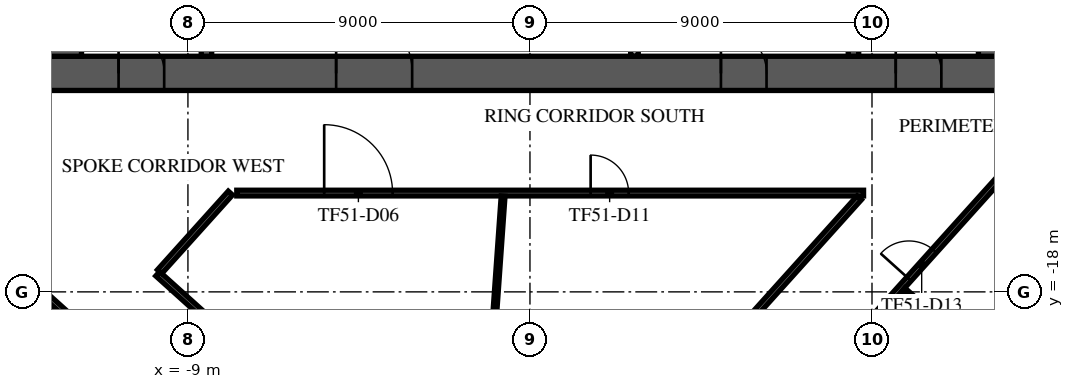
"""IFC4 building model, lengths in metres.
Left out: names, types, materials, properties, quantities, classifications, styles, units other than length and angle.
Written with IfcOpenShell. Run it as: python <this file> out.ifc"""

import sys

from ifc_helpers import new_model, si_unit, direction, frame, frame_2d, origin, place, context, subcontext, project, spatial, rectangle, extrude, element, fill, save


model = new_model("IFC4")
c1 = context("Model", 3, precision=1e-05, world=origin(), true_north=direction((0.0, 1.0)))
c2 = subcontext(c1, "Body", "Model", "MODEL_VIEW")
j1 = project(units=[si_unit("LENGTHUNIT", "METRE"), si_unit("PLANEANGLEUNIT", "RADIAN")], contexts=[c1])
p1 = place(None, origin())
s1 = spatial("IfcSite", under=j1, at=p1, CompositionType="ELEMENT")
p2 = place(p1, origin())
s2 = spatial("IfcBuilding", under=s1, at=p2, CompositionType="ELEMENT")
p3 = place(p2, frame((0.0, 0.0, 217.3)))
s3 = spatial("IfcBuildingStorey", under=s2, at=p3, CompositionType="ELEMENT", Elevation=217.3)
p4 = place(p3, frame((-12.7, -12.25, 0.0), z_axis=(0.0, 0.0, 1.0), x_axis=(1.0, 0.0, 0.0)))
e1 = element("IfcWall", 1, at=p4, inside=s3, PredefinedType="SHEAR", context=c2, shape_type="SweptSolid", body=[
    extrude(rectangle(XDim=25.4, YDim=0.9, at=frame_2d((12.7, 0.0))), origin(), (0.0, 0.0, 1.0), 3.62),
])
p5 = place(p4, frame((7.6, 0.0, 0.0)))
e2 = element("IfcOpeningElement", 2, at=p5, cuts=e1, PredefinedType="OPENING", context=c2, shape_type="SweptSolid", body=[
    extrude(rectangle(XDim=2.0, YDim=2.1, at=frame_2d((1.0, 1.05))), frame((0.0, 0.46, 0.0), z_axis=(0.0, -1.0, 0.0), x_axis=(1.0, 0.0, 0.0)), (0.0, 0.0, 1.0), 0.92),
])
p6 = place(p4, frame((17.725, 0.0, 0.0)))
e3 = element("IfcOpeningElement", 3, at=p6, cuts=e1, PredefinedType="OPENING", context=c2, shape_type="SweptSolid", body=[
    extrude(rectangle(XDim=1.2, YDim=2.1, at=frame_2d((0.6, 1.05))), frame((0.0, 0.46, 0.0), z_axis=(0.0, -1.0, 0.0), x_axis=(1.0, 0.0, 0.0)), (0.0, 0.0, 1.0), 0.92),
])
p7 = place(p4, frame((1.875, 0.0, 0.0)))
e4 = element("IfcOpeningElement", 4, at=p7, cuts=e1, PredefinedType="OPENING", context=c2, shape_type="SweptSolid", body=[
    extrude(rectangle(XDim=1.2, YDim=2.1, at=frame_2d((0.6, 1.05))), frame((0.0, 0.46, 0.0), z_axis=(0.0, -1.0, 0.0), x_axis=(1.0, 0.0, 0.0)), (0.0, 0.0, 1.0), 0.92),
])
p8 = place(p4, frame((22.325, 0.0, 0.0)))
e5 = element("IfcOpeningElement", 5, at=p8, cuts=e1, PredefinedType="OPENING", context=c2, shape_type="SweptSolid", body=[
    extrude(rectangle(XDim=1.2, YDim=2.1, at=frame_2d((0.6, 1.05))), frame((0.0, 0.46, 0.0), z_axis=(0.0, -1.0, 0.0), x_axis=(1.0, 0.0, 0.0)), (0.0, 0.0, 1.0), 0.92),
])
p9 = place(p3, frame((12.25, -11.8, 0.0), z_axis=(0.0, 0.0, 1.0), x_axis=(0.0, 1.0, 0.0)))
e6 = element("IfcWall", 6, at=p9, inside=s3, PredefinedType="SHEAR", context=c2, shape_type="SweptSolid", body=[
    extrude(rectangle(XDim=23.6, YDim=0.9, at=frame_2d((11.8, 0.0))), origin(), (0.0, 0.0, 1.0), 3.62),
])
p10 = place(p9, frame((10.6, 0.0, 0.0)))
e7 = element("IfcOpeningElement", 7, at=p10, cuts=e6, PredefinedType="OPENING", context=c2, shape_type="SweptSolid", body=[
    extrude(rectangle(XDim=2.4, YDim=2.4, at=frame_2d((1.2, 1.2))), frame((0.0, 0.46, 0.0), z_axis=(0.0, -1.0, 0.0), x_axis=(1.0, 0.0, 0.0)), (0.0, 0.0, 1.0), 0.92),
])
p11 = place(p3, frame((-12.25, -11.8, 0.0), z_axis=(0.0, 0.0, 1.0), x_axis=(0.0, 1.0, 0.0)))
e8 = element("IfcWall", 8, at=p11, inside=s3, PredefinedType="SHEAR", context=c2, shape_type="SweptSolid", body=[
    extrude(rectangle(XDim=23.6, YDim=0.9, at=frame_2d((11.8, 0.0))), origin(), (0.0, 0.0, 1.0), 3.62),
])
p12 = place(p11, frame((10.6, 0.0, 0.0)))
e9 = element("IfcOpeningElement", 9, at=p12, cuts=e8, PredefinedType="OPENING", context=c2, shape_type="SweptSolid", body=[
    extrude(rectangle(XDim=2.4, YDim=2.4, at=frame_2d((1.2, 1.2))), frame((0.0, 0.46, 0.0), z_axis=(0.0, -1.0, 0.0), x_axis=(1.0, 0.0, 0.0)), (0.0, 0.0, 1.0), 0.92),
])
p13 = place(p3, frame((-8.512, -4.55, 0.0), z_axis=(0.0, 0.0, 1.0), x_axis=(0.0, -1.0, 0.0)))
e10 = element("IfcWall", 10, at=p13, inside=s3, PredefinedType="SOLIDWALL", context=c2, shape_type="SweptSolid", body=[
    extrude(rectangle(XDim=7.25, YDim=0.275, at=frame_2d((3.625, 0.0))), origin(), (0.0, 0.0, 1.0), 3.62),
])
p14 = place(p13, frame((6.0, 0.0, 0.0)))
e11 = element("IfcOpeningElement", 11, at=p14, cuts=e10, PredefinedType="OPENING", context=c2, shape_type="SweptSolid", body=[
    extrude(rectangle(XDim=1.0, YDim=2.1, at=frame_2d((0.5, 1.05))), frame((0.0, 0.147, 0.0), z_axis=(0.0, -1.0, 0.0), x_axis=(1.0, 0.0, 0.0)), (0.0, 0.0, 1.0), 0.295),
])
p15 = place(p3, frame((8.512, -4.55, 0.0), z_axis=(0.0, 0.0, 1.0), x_axis=(0.0, -1.0, 0.0)))
e12 = element("IfcWall", 12, at=p15, inside=s3, PredefinedType="SOLIDWALL", context=c2, shape_type="SweptSolid", body=[
    extrude(rectangle(XDim=7.25, YDim=0.275, at=frame_2d((3.625, 0.0))), origin(), (0.0, 0.0, 1.0), 3.62),
])
p16 = place(p15, frame((6.0, 0.0, 0.0)))
e13 = element("IfcOpeningElement", 13, at=p16, cuts=e12, PredefinedType="OPENING", context=c2, shape_type="SweptSolid", body=[
    extrude(rectangle(XDim=1.0, YDim=2.1, at=frame_2d((0.5, 1.05))), frame((0.0, 0.147, 0.0), z_axis=(0.0, -1.0, 0.0), x_axis=(1.0, 0.0, 0.0)), (0.0, 0.0, 1.0), 0.295),
])
p17 = place(p3, frame((2.75, -11.795, 0.0), z_axis=(0.0, 0.0, 1.0), x_axis=(0.0, 1.0, 0.0)))
e14 = element("IfcWall", 14, at=p17, inside=s3, PredefinedType="PARTITIONING", context=c2, shape_type="SweptSolid", body=[
    extrude(rectangle(XDim=2.99, YDim=0.2, at=frame_2d((1.495, 0.0))), origin(), (0.0, 0.0, 1.0), 3.62),
])
p18 = place(p3, frame((-34.365, -9.023, 0.0), z_axis=(0.0, 0.0, 1.0), x_axis=(0.743146896498, -0.66912830625, 0.0)))
e15 = element("IfcWall", 15, at=p18, inside=s3, PredefinedType="STANDARD", context=c2, shape_type="SweptSolid", body=[
    extrude(rectangle(XDim=39.0, YDim=0.6, at=frame_2d((19.5, 0.0))), origin(), (0.0, 0.0, 1.0), 3.62),
])
p19 = place(p18, frame((1.217, 0.0, 0.9)))
e16 = element("IfcOpeningElement", 16, at=p19, cuts=e15, PredefinedType="OPENING", context=c2, shape_type="SweptSolid", body=[
    extrude(rectangle(XDim=1.9, YDim=2.1, at=frame_2d((0.95, 1.05))), frame((0.0, 0.31, 0.0), z_axis=(0.0, -1.0, 0.0), x_axis=(1.0, 0.0, 0.0)), (0.0, 0.0, 1.0), 0.62),
])
p20 = place(p18, frame((5.55, 0.0, 0.9)))
e17 = element("IfcOpeningElement", 17, at=p20, cuts=e15, PredefinedType="OPENING", context=c2, shape_type="SweptSolid", body=[
    extrude(rectangle(XDim=1.9, YDim=2.1, at=frame_2d((0.95, 1.05))), frame((0.0, 0.31, 0.0), z_axis=(0.0, -1.0, 0.0), x_axis=(1.0, 0.0, 0.0)), (0.0, 0.0, 1.0), 0.62),
])
p21 = place(p18, frame((9.883, 0.0, 0.9)))
e18 = element("IfcOpeningElement", 18, at=p21, cuts=e15, PredefinedType="OPENING", context=c2, shape_type="SweptSolid", body=[
    extrude(rectangle(XDim=1.9, YDim=2.1, at=frame_2d((0.95, 1.05))), frame((0.0, 0.31, 0.0), z_axis=(0.0, -1.0, 0.0), x_axis=(1.0, 0.0, 0.0)), (0.0, 0.0, 1.0), 0.62),
])
p22 = place(p18, frame((14.217, 0.0, 0.9)))
e19 = element("IfcOpeningElement", 19, at=p22, cuts=e15, PredefinedType="OPENING", context=c2, shape_type="SweptSolid", body=[
    extrude(rectangle(XDim=1.9, YDim=2.1, at=frame_2d((0.95, 1.05))), frame((0.0, 0.31, 0.0), z_axis=(0.0, -1.0, 0.0), x_axis=(1.0, 0.0, 0.0)), (0.0, 0.0, 1.0), 0.62),
])
p23 = place(p18, frame((18.55, 0.0, 0.9)))
e20 = element("IfcOpeningElement", 20, at=p23, cuts=e15, PredefinedType="OPENING", context=c2, shape_type="SweptSolid", body=[
    extrude(rectangle(XDim=1.9, YDim=2.1, at=frame_2d((0.95, 1.05))), frame((0.0, 0.31, 0.0), z_axis=(0.0, -1.0, 0.0), x_axis=(1.0, 0.0, 0.0)), (0.0, 0.0, 1.0), 0.62),
])
p24 = place(p18, frame((22.883, 0.0, 0.9)))
e21 = element("IfcOpeningElement", 21, at=p24, cuts=e15, PredefinedType="OPENING", context=c2, shape_type="SweptSolid", body=[
    extrude(rectangle(XDim=1.9, YDim=2.1, at=frame_2d((0.95, 1.05))), frame((0.0, 0.31, 0.0), z_axis=(0.0, -1.0, 0.0), x_axis=(1.0, 0.0, 0.0)), (0.0, 0.0, 1.0), 0.62),
])
p25 = place(p18, frame((27.217, 0.0, 0.9)))
e22 = element("IfcOpeningElement", 22, at=p25, cuts=e15, PredefinedType="OPENING", context=c2, shape_type="SweptSolid", body=[
    extrude(rectangle(XDim=1.9, YDim=2.1, at=frame_2d((0.95, 1.05))), frame((0.0, 0.31, 0.0), z_axis=(0.0, -1.0, 0.0), x_axis=(1.0, 0.0, 0.0)), (0.0, 0.0, 1.0), 0.62),
])
p26 = place(p18, frame((31.55, 0.0, 0.9)))
e23 = element("IfcOpeningElement", 23, at=p26, cuts=e15, PredefinedType="OPENING", context=c2, shape_type="SweptSolid", body=[
    extrude(rectangle(XDim=1.9, YDim=2.1, at=frame_2d((0.95, 1.05))), frame((0.0, 0.31, 0.0), z_axis=(0.0, -1.0, 0.0), x_axis=(1.0, 0.0, 0.0)), (0.0, 0.0, 1.0), 0.62),
])
p27 = place(p18, frame((35.883, 0.0, 0.9)))
e24 = element("IfcOpeningElement", 24, at=p27, cuts=e15, PredefinedType="OPENING", context=c2, shape_type="SweptSolid", body=[
    extrude(rectangle(XDim=1.9, YDim=2.1, at=frame_2d((0.95, 1.05))), frame((0.0, 0.31, 0.0), z_axis=(0.0, -1.0, 0.0), x_axis=(1.0, 0.0, 0.0)), (0.0, 0.0, 1.0), 0.62),
])
p28 = place(p3, frame((1.962, -34.735, 0.0), z_axis=(0.0, 0.0, 1.0), x_axis=(0.669133181838, 0.743142506497, 0.0)))
e25 = element("IfcWall", 25, at=p28, inside=s3, PredefinedType="STANDARD", context=c2, shape_type="SweptSolid", body=[
    extrude(rectangle(XDim=49.0, YDim=0.6, at=frame_2d((24.5, 0.0))), origin(), (0.0, 0.0, 1.0), 3.62),
])
p29 = place(p28, frame((1.227, 0.0, 0.9)))
e26 = element("IfcOpeningElement", 26, at=p29, cuts=e25, PredefinedType="OPENING", context=c2, shape_type="SweptSolid", body=[
    extrude(rectangle(XDim=2.0, YDim=2.1, at=frame_2d((1.0, 1.05))), frame((0.0, 0.31, 0.0), z_axis=(0.0, -1.0, 0.0), x_axis=(1.0, 0.0, 0.0)), (0.0, 0.0, 1.0), 0.62),
])
p30 = place(p28, frame((5.682, 0.0, 0.9)))
e27 = element("IfcOpeningElement", 27, at=p30, cuts=e25, PredefinedType="OPENING", context=c2, shape_type="SweptSolid", body=[
    extrude(rectangle(XDim=2.0, YDim=2.1, at=frame_2d((1.0, 1.05))), frame((0.0, 0.31, 0.0), z_axis=(0.0, -1.0, 0.0), x_axis=(1.0, 0.0, 0.0)), (0.0, 0.0, 1.0), 0.62),
])
p31 = place(p28, frame((10.136, 0.0, 0.9)))
e28 = element("IfcOpeningElement", 28, at=p31, cuts=e25, PredefinedType="OPENING", context=c2, shape_type="SweptSolid", body=[
    extrude(rectangle(XDim=2.0, YDim=2.1, at=frame_2d((1.0, 1.05))), frame((0.0, 0.31, 0.0), z_axis=(0.0, -1.0, 0.0), x_axis=(1.0, 0.0, 0.0)), (0.0, 0.0, 1.0), 0.62),
])
p32 = place(p28, frame((14.591, 0.0, 0.9)))
e29 = element("IfcOpeningElement", 29, at=p32, cuts=e25, PredefinedType="OPENING", context=c2, shape_type="SweptSolid", body=[
    extrude(rectangle(XDim=2.0, YDim=2.1, at=frame_2d((1.0, 1.05))), frame((0.0, 0.31, 0.0), z_axis=(0.0, -1.0, 0.0), x_axis=(1.0, 0.0, 0.0)), (0.0, 0.0, 1.0), 0.62),
])
p33 = place(p28, frame((19.045, 0.0, 0.9)))
e30 = element("IfcOpeningElement", 30, at=p33, cuts=e25, PredefinedType="OPENING", context=c2, shape_type="SweptSolid", body=[
    extrude(rectangle(XDim=2.0, YDim=2.1, at=frame_2d((1.0, 1.05))), frame((0.0, 0.31, 0.0), z_axis=(0.0, -1.0, 0.0), x_axis=(1.0, 0.0, 0.0)), (0.0, 0.0, 1.0), 0.62),
])
p34 = place(p28, frame((23.5, 0.0, 0.9)))
e31 = element("IfcOpeningElement", 31, at=p34, cuts=e25, PredefinedType="OPENING", context=c2, shape_type="SweptSolid", body=[
    extrude(rectangle(XDim=2.0, YDim=2.1, at=frame_2d((1.0, 1.05))), frame((0.0, 0.31, 0.0), z_axis=(0.0, -1.0, 0.0), x_axis=(1.0, 0.0, 0.0)), (0.0, 0.0, 1.0), 0.62),
])
p35 = place(p28, frame((27.955, 0.0, 0.9)))
e32 = element("IfcOpeningElement", 32, at=p35, cuts=e25, PredefinedType="OPENING", context=c2, shape_type="SweptSolid", body=[
    extrude(rectangle(XDim=2.0, YDim=2.1, at=frame_2d((1.0, 1.05))), frame((0.0, 0.31, 0.0), z_axis=(0.0, -1.0, 0.0), x_axis=(1.0, 0.0, 0.0)), (0.0, 0.0, 1.0), 0.62),
])
p36 = place(p28, frame((32.409, 0.0, 0.9)))
e33 = element("IfcOpeningElement", 33, at=p36, cuts=e25, PredefinedType="OPENING", context=c2, shape_type="SweptSolid", body=[
    extrude(rectangle(XDim=2.0, YDim=2.1, at=frame_2d((1.0, 1.05))), frame((0.0, 0.31, 0.0), z_axis=(0.0, -1.0, 0.0), x_axis=(1.0, 0.0, 0.0)), (0.0, 0.0, 1.0), 0.62),
])
p37 = place(p28, frame((36.864, 0.0, 0.9)))
e34 = element("IfcOpeningElement", 34, at=p37, cuts=e25, PredefinedType="OPENING", context=c2, shape_type="SweptSolid", body=[
    extrude(rectangle(XDim=2.0, YDim=2.1, at=frame_2d((1.0, 1.05))), frame((0.0, 0.31, 0.0), z_axis=(0.0, -1.0, 0.0), x_axis=(1.0, 0.0, 0.0)), (0.0, 0.0, 1.0), 0.62),
])
p38 = place(p28, frame((41.318, 0.0, 0.9)))
e35 = element("IfcOpeningElement", 35, at=p38, cuts=e25, PredefinedType="OPENING", context=c2, shape_type="SweptSolid", body=[
    extrude(rectangle(XDim=2.0, YDim=2.1, at=frame_2d((1.0, 1.05))), frame((0.0, 0.31, 0.0), z_axis=(0.0, -1.0, 0.0), x_axis=(1.0, 0.0, 0.0)), (0.0, 0.0, 1.0), 0.62),
])
p39 = place(p28, frame((45.773, 0.0, 0.9)))
e36 = element("IfcOpeningElement", 36, at=p39, cuts=e25, PredefinedType="OPENING", context=c2, shape_type="SweptSolid", body=[
    extrude(rectangle(XDim=2.0, YDim=2.1, at=frame_2d((1.0, 1.05))), frame((0.0, 0.31, 0.0), z_axis=(0.0, -1.0, 0.0), x_axis=(1.0, 0.0, 0.0)), (0.0, 0.0, 1.0), 0.62),
])
p40 = place(p3, frame((-24.285, -7.708, 0.0), z_axis=(0.0, 0.0, 1.0), x_axis=(0.743144813636, -0.66913061951, 0.0)))
e37 = element("IfcWall", 37, at=p40, inside=s3, PredefinedType="PARTITIONING", context=c2, shape_type="SweptSolid", body=[
    extrude(rectangle(XDim=25.854, YDim=0.15, at=frame_2d((12.927, 0.0))), origin(), (0.0, 0.0, 1.0), 3.17),
])
p41 = place(p40, frame((9.29, 0.0, 0.0)))
e38 = element("IfcOpeningElement", 38, at=p41, cuts=e37, PredefinedType="OPENING", context=c2, shape_type="SweptSolid", body=[
    extrude(rectangle(XDim=1.0, YDim=2.1, at=frame_2d((0.5, 1.05))), frame((0.0, 0.085, 0.0), z_axis=(0.0, -1.0, 0.0), x_axis=(1.0, 0.0, 0.0)), (0.0, 0.0, 1.0), 0.17),
])
p42 = place(p3, frame((-9.796, -17.525, 0.0), z_axis=(0.0, 0.0, 1.0), x_axis=(0.743155880954, -0.669118327804, 0.0)))
e39 = element("IfcWall", 39, at=p42, inside=s3, PredefinedType="PARTITIONING", context=c2, shape_type="SweptSolid", body=[
    extrude(rectangle(XDim=8.518, YDim=0.15, at=frame_2d((4.259, 0.0))), origin(), (0.0, 0.0, 1.0), 3.17),
])
p43 = place(p42, frame((2.55, 0.0, 0.0)))
e40 = element("IfcOpeningElement", 40, at=p43, cuts=e39, PredefinedType="OPENING", context=c2, shape_type="SweptSolid", body=[
    extrude(rectangle(XDim=1.0, YDim=2.1, at=frame_2d((0.5, 1.05))), frame((0.0, 0.085, 0.0), z_axis=(0.0, -1.0, 0.0), x_axis=(1.0, 0.0, 0.0)), (0.0, 0.0, 1.0), 0.17),
])
p44 = place(p3, frame((-9.746, -17.469, 0.0), z_axis=(0.0, 0.0, 1.0), x_axis=(0.669042240246, 0.74322438117, 0.0)))
e41 = element("IfcWall", 41, at=p44, inside=s3, PredefinedType="PARTITIONING", context=c2, shape_type="SweptSolid", body=[
    extrude(rectangle(XDim=2.784, YDim=0.15, at=frame_2d((1.392, 0.0))), origin(), (0.0, 0.0, 1.0), 3.17),
])
p45 = place(p3, frame((-7.715, -15.4, 0.0), z_axis=(0.0, 0.0, 1.0), x_axis=(1.0, 0.0, 0.0)))
e42 = element("IfcWall", 42, at=p45, inside=s3, PredefinedType="PARTITIONING", context=c2, shape_type="SweptSolid", body=[
    extrude(rectangle(XDim=16.493, YDim=0.15, at=frame_2d((8.246, 0.0))), origin(), (0.0, 0.0, 1.0), 3.17),
])
p46 = place(p45, frame((2.3, 0.0, 0.0)))
e43 = element("IfcOpeningElement", 43, at=p46, cuts=e42, PredefinedType="OPENING", context=c2, shape_type="SweptSolid", body=[
    extrude(rectangle(XDim=1.8, YDim=2.1, at=frame_2d((0.9, 1.05))), frame((0.0, 0.085, 0.0), z_axis=(0.0, -1.0, 0.0), x_axis=(1.0, 0.0, 0.0)), (0.0, 0.0, 1.0), 0.17),
])
p47 = place(p45, frame((9.311, 0.0, 0.0)))
e44 = element("IfcOpeningElement", 44, at=p47, cuts=e42, PredefinedType="OPENING", context=c2, shape_type="SweptSolid", body=[
    extrude(rectangle(XDim=1.0, YDim=2.1, at=frame_2d((0.5, 1.05))), frame((0.0, 0.085, 0.0), z_axis=(0.0, -1.0, 0.0), x_axis=(1.0, 0.0, 0.0)), (0.0, 0.0, 1.0), 0.17),
])
p48 = place(p3, frame((1.843, -23.103, 0.0), z_axis=(0.0, 0.0, 1.0), x_axis=(0.669082457394, 0.743188176176, 0.0)))
e45 = element("IfcWall", 45, at=p48, inside=s3, PredefinedType="PARTITIONING", context=c2, shape_type="SweptSolid", body=[
    extrude(rectangle(XDim=10.197, YDim=0.15, at=frame_2d((5.098, 0.0))), origin(), (0.0, 0.0, 1.0), 3.17),
])
p49 = place(p48, frame((1.05, 0.0, 0.0)))
e46 = element("IfcOpeningElement", 46, at=p49, cuts=e45, PredefinedType="OPENING", context=c2, shape_type="SweptSolid", body=[
    extrude(rectangle(XDim=1.8, YDim=2.1, at=frame_2d((0.9, 1.05))), frame((0.0, 0.085, 0.0), z_axis=(0.0, -1.0, 0.0), x_axis=(1.0, 0.0, 0.0)), (0.0, 0.0, 1.0), 0.17),
])
p50 = place(p3, frame((3.676, -24.653, 0.0), z_axis=(0.0, 0.0, 1.0), x_axis=(0.669124220942, 0.743150574882, 0.0)))
e47 = element("IfcWall", 47, at=p50, inside=s3, PredefinedType="PARTITIONING", context=c2, shape_type="SweptSolid", body=[
    extrude(rectangle(XDim=31.796, YDim=0.15, at=frame_2d((15.898, 0.0))), origin(), (0.0, 0.0, 1.0), 3.17),
])
p51 = place(p50, frame((9.41, 0.0, 0.0)))
e48 = element("IfcOpeningElement", 48, at=p51, cuts=e47, PredefinedType="OPENING", context=c2, shape_type="SweptSolid", body=[
    extrude(rectangle(XDim=1.0, YDim=2.1, at=frame_2d((0.5, 1.05))), frame((0.0, 0.085, 0.0), z_axis=(0.0, -1.0, 0.0), x_axis=(1.0, 0.0, 0.0)), (0.0, 0.0, 1.0), 0.17),
])
p52 = place(p50, frame((23.981, 0.0, 0.0)))
e49 = element("IfcOpeningElement", 49, at=p52, cuts=e47, PredefinedType="OPENING", context=c2, shape_type="SweptSolid", body=[
    extrude(rectangle(XDim=1.0, YDim=2.1, at=frame_2d((0.5, 1.05))), frame((0.0, 0.085, 0.0), z_axis=(0.0, -1.0, 0.0), x_axis=(1.0, 0.0, 0.0)), (0.0, 0.0, 1.0), 0.17),
])
p53 = place(p3, frame((-1.655, -28.879, 0.0), z_axis=(0.0, 0.0, 1.0), x_axis=(0.070623224113, 0.99750306276, 0.0)))
e50 = element("IfcWall", 50, at=p53, inside=s3, PredefinedType="PARTITIONING", context=c2, shape_type="SweptSolid", body=[
    extrude(rectangle(XDim=13.434, YDim=0.1, at=frame_2d((6.717, 0.0))), origin(), (0.0, 0.0, 1.0), 3.05),
])
p54 = place(p3, frame((9.829, -17.933, 0.0), z_axis=(0.0, 0.0, 1.0), x_axis=(0.751096490624, -0.660192442984, 0.0)))
e51 = element("IfcWall", 51, at=p54, inside=s3, PredefinedType="PARTITIONING", context=c2, shape_type="SweptSolid", body=[
    extrude(rectangle(XDim=5.095, YDim=0.1, at=frame_2d((2.547, 0.0))), origin(), (0.0, 0.0, 1.0), 2.97),
])
p55 = place(p5, origin())
e52 = element("IfcDoor", 52, at=p55, inside=s3, OperationType="SINGLE_SWING_LEFT", PredefinedType="DOOR", context=c2, shape_type="SweptSolid", body=[
    extrude(rectangle(XDim=2.0, YDim=2.1, at=frame_2d((1.0, 1.05))), frame((0.0, 0.025, 0.0), z_axis=(0.0, -1.0, 0.0), x_axis=(1.0, 0.0, 0.0)), (0.0, 0.0, 1.0), 0.05),
])
fill(e2, e52)
p56 = place(p6, origin())
e53 = element("IfcDoor", 53, at=p56, inside=s3, OperationType="SINGLE_SWING_LEFT", PredefinedType="DOOR", context=c2, shape_type="SweptSolid", body=[
    extrude(rectangle(XDim=1.2, YDim=2.1, at=frame_2d((0.6, 1.05))), frame((0.0, 0.025, 0.0), z_axis=(0.0, -1.0, 0.0), x_axis=(1.0, 0.0, 0.0)), (0.0, 0.0, 1.0), 0.05),
])
fill(e3, e53)
p57 = place(p7, origin())
e54 = element("IfcDoor", 54, at=p57, inside=s3, OperationType="SINGLE_SWING_LEFT", PredefinedType="DOOR", context=c2, shape_type="SweptSolid", body=[
    extrude(rectangle(XDim=1.2, YDim=2.1, at=frame_2d((0.6, 1.05))), frame((0.0, 0.025, 0.0), z_axis=(0.0, -1.0, 0.0), x_axis=(1.0, 0.0, 0.0)), (0.0, 0.0, 1.0), 0.05),
])
fill(e4, e54)
p58 = place(p8, origin())
e55 = element("IfcDoor", 55, at=p58, inside=s3, OperationType="SINGLE_SWING_LEFT", PredefinedType="DOOR", context=c2, shape_type="SweptSolid", body=[
    extrude(rectangle(XDim=1.2, YDim=2.1, at=frame_2d((0.6, 1.05))), frame((0.0, 0.025, 0.0), z_axis=(0.0, -1.0, 0.0), x_axis=(1.0, 0.0, 0.0)), (0.0, 0.0, 1.0), 0.05),
])
fill(e5, e55)
p59 = place(p46, frame((1.8, 0.0, 0.0), z_axis=(0.0, 0.0, 1.0), x_axis=(-1.0, 0.0, 0.0)))
e56 = element("IfcDoor", 56, at=p59, inside=s3, OperationType="DOUBLE_DOOR_SINGLE_SWING", PredefinedType="DOOR", context=c2, shape_type="SweptSolid", body=[
    extrude(rectangle(XDim=1.8, YDim=2.1, at=frame_2d((0.9, 1.05))), frame((0.0, 0.025, 0.0), z_axis=(0.0, -1.0, 0.0), x_axis=(1.0, 0.0, 0.0)), (0.0, 0.0, 1.0), 0.05),
])
fill(e43, e56)
p60 = place(p47, frame((1.0, 0.0, 0.0), z_axis=(0.0, 0.0, 1.0), x_axis=(-1.0, 0.0, 0.0)))
e57 = element("IfcDoor", 57, at=p60, inside=s3, OperationType="SINGLE_SWING_LEFT", PredefinedType="DOOR", context=c2, shape_type="SweptSolid", body=[
    extrude(rectangle(XDim=1.0, YDim=2.1, at=frame_2d((0.5, 1.05))), frame((0.0, 0.025, 0.0), z_axis=(0.0, -1.0, 0.0), x_axis=(1.0, 0.0, 0.0)), (0.0, 0.0, 1.0), 0.05),
])
fill(e44, e57)
p61 = place(p51, frame((1.0, 0.0, 0.0), z_axis=(0.0, 0.0, 1.0), x_axis=(-1.0, 0.0, 0.0)))
e58 = element("IfcDoor", 58, at=p61, inside=s3, OperationType="SINGLE_SWING_LEFT", PredefinedType="DOOR", context=c2, shape_type="SweptSolid", body=[
    extrude(rectangle(XDim=1.0, YDim=2.1, at=frame_2d((0.5, 1.05))), frame((0.0, 0.025, 0.0), z_axis=(0.0, -1.0, 0.0), x_axis=(1.0, 0.0, 0.0)), (0.0, 0.0, 1.0), 0.05),
])
fill(e48, e58)
save(model, sys.argv[1])
